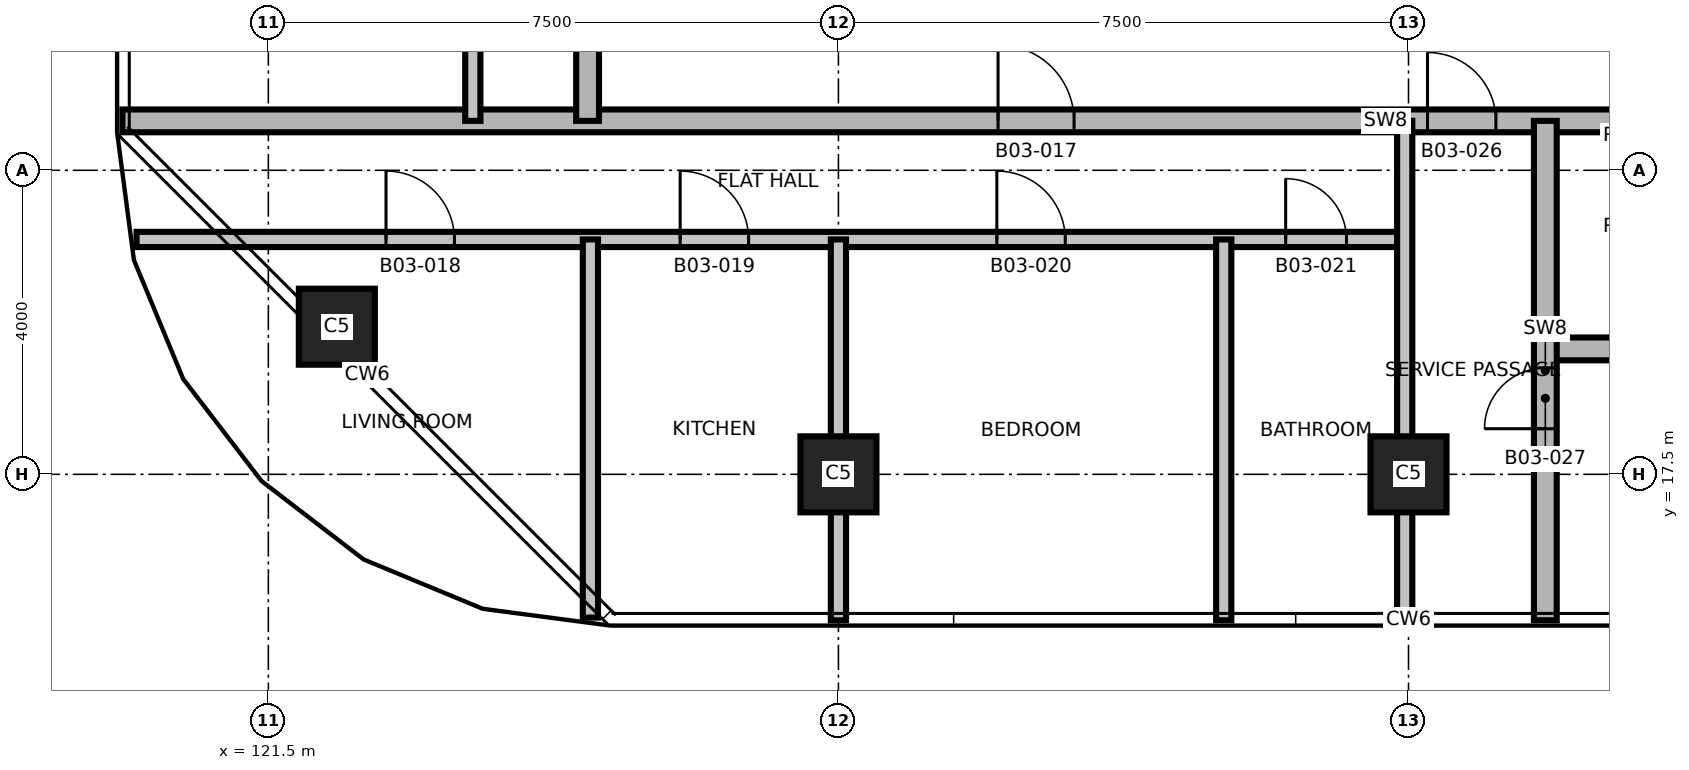
"""IFC4 building model, lengths in metres.
Left out: names, types, materials, properties, quantities, classifications, styles, units other than length and angle.
Written with IfcOpenShell. Run it as: python <this file> out.ifc"""

import sys

from ifc_helpers import new_model, si_unit, direction, frame, frame_2d, origin, origin_2d, place, context, subcontext, project, spatial, rectangle, extrude, element, fill, save


model = new_model("IFC4")
c1 = context("Model", 3, precision=1e-05, world=origin(), true_north=direction((0.0, 1.0)))
c2 = subcontext(c1, "Body", "Model", "MODEL_VIEW")
j1 = project(units=[si_unit("LENGTHUNIT", "METRE"), si_unit("PLANEANGLEUNIT", "RADIAN")], contexts=[c1])
p1 = place(None, origin())
s1 = spatial("IfcSite", under=j1, at=p1, CompositionType="ELEMENT")
p2 = place(p1, origin())
s2 = spatial("IfcBuilding", under=s1, at=p2, CompositionType="ELEMENT")
p3 = place(p2, frame((0.0, 0.0, 55.7)))
s3 = spatial("IfcBuildingStorey", under=s2, at=p3, CompositionType="ELEMENT", Elevation=55.7)
for number, where, z_axis, x_axis in (
    (1, (129.0, 17.5, 0.0), (0.0, 0.0, 1.0), (1.0, 0.0, 0.0)),
    (2, (136.5, 17.5, 0.0), (0.0, 0.0, 1.0), (1.0, 0.0, 0.0)),
    (3, (122.401, 19.442, 0.0), (0.0, 0.0, 1.0), (1.0, 0.0, 0.0)),
):
    element("IfcColumn", number, at=place(p3, frame(where, z_axis=z_axis, x_axis=x_axis)), inside=s3, PredefinedType="COLUMN", context=c2, shape_type="SweptSolid", body=[
        extrude(rectangle(XDim=1.0, YDim=1.0, at=origin_2d()), origin(), (0.0, 0.0, 1.0), 3.7),
    ])
p4 = place(p3, frame((138.25, 19.15, 0.0), z_axis=(0.0, 0.0, 1.0), x_axis=(1.0, 0.0, 0.0)))
e4 = element("IfcWall", 4, at=p4, inside=s3, PredefinedType="SHEAR", context=c2, shape_type="SweptSolid", body=[
    extrude(rectangle(XDim=5.75, YDim=0.3, at=frame_2d((2.875, 0.0))), origin(), (0.0, 0.0, 1.0), 3.4),
])
p5 = place(p3, frame((119.766, 20.59, 0.0), z_axis=(0.0, 0.0, 1.0), x_axis=(1.0, 0.0, 0.0)))
e5 = element("IfcWall", 5, at=p5, inside=s3, PredefinedType="PARTITIONING", context=c2, shape_type="SweptSolid", body=[
    extrude(rectangle(XDim=16.734, YDim=0.2, at=frame_2d((8.367, 0.0))), origin(), (0.0, 0.0, 1.0), 3.4),
])
p6 = place(p5, frame((3.282, 0.0, 0.0)))
e6 = element("IfcOpeningElement", 6, at=p6, cuts=e5, PredefinedType="OPENING", context=c2, shape_type="SweptSolid", body=[
    extrude(rectangle(XDim=0.9, YDim=2.1, at=frame_2d((0.45, 1.05))), frame((0.0, 0.11, 0.0), z_axis=(0.0, -1.0, 0.0), x_axis=(1.0, 0.0, 0.0)), (0.0, 0.0, 1.0), 0.22),
])
p7 = place(p5, frame((7.152, 0.0, 0.0)))
e7 = element("IfcOpeningElement", 7, at=p7, cuts=e5, PredefinedType="OPENING", context=c2, shape_type="SweptSolid", body=[
    extrude(rectangle(XDim=0.9, YDim=2.1, at=frame_2d((0.45, 1.05))), frame((0.0, 0.11, 0.0), z_axis=(0.0, -1.0, 0.0), x_axis=(1.0, 0.0, 0.0)), (0.0, 0.0, 1.0), 0.22),
])
p8 = place(p5, frame((11.318, 0.0, 0.0)))
e8 = element("IfcOpeningElement", 8, at=p8, cuts=e5, PredefinedType="OPENING", context=c2, shape_type="SweptSolid", body=[
    extrude(rectangle(XDim=0.9, YDim=2.1, at=frame_2d((0.45, 1.05))), frame((0.0, 0.11, 0.0), z_axis=(0.0, -1.0, 0.0), x_axis=(1.0, 0.0, 0.0)), (0.0, 0.0, 1.0), 0.22),
])
p9 = place(p5, frame((15.118, 0.0, 0.0)))
e9 = element("IfcOpeningElement", 9, at=p9, cuts=e5, PredefinedType="OPENING", context=c2, shape_type="SweptSolid", body=[
    extrude(rectangle(XDim=0.8, YDim=2.1, at=frame_2d((0.4, 1.05))), frame((0.0, 0.11, 0.0), z_axis=(0.0, -1.0, 0.0), x_axis=(1.0, 0.0, 0.0)), (0.0, 0.0, 1.0), 0.22),
])
p10 = place(p3, frame((119.58, 22.15, 0.0), z_axis=(0.0, 0.0, 1.0), x_axis=(1.0, 0.0, 0.0)))
e10 = element("IfcWall", 10, at=p10, inside=s3, PredefinedType="SHEAR", context=c2, shape_type="SweptSolid", body=[
    extrude(rectangle(XDim=33.84, YDim=0.3, at=frame_2d((16.92, 0.0))), origin(), (0.0, 0.0, 1.0), 3.4),
])
p11 = place(p10, frame((23.17, 0.0, 0.0)))
e11 = element("IfcOpeningElement", 11, at=p11, cuts=e10, PredefinedType="OPENING", context=c2, shape_type="SweptSolid", body=[
    extrude(rectangle(XDim=1.0, YDim=2.1, at=frame_2d((0.5, 1.05))), frame((0.0, 0.16, 0.0), z_axis=(0.0, -1.0, 0.0), x_axis=(1.0, 0.0, 0.0)), (0.0, 0.0, 1.0), 0.32),
])
p12 = place(p10, frame((11.52, 0.0, 0.0)))
e12 = element("IfcOpeningElement", 12, at=p12, cuts=e10, PredefinedType="OPENING", context=c2, shape_type="SweptSolid", body=[
    extrude(rectangle(XDim=1.0, YDim=2.1, at=frame_2d((0.5, 1.05))), frame((0.0, 0.16, 0.0), z_axis=(0.0, -1.0, 0.0), x_axis=(1.0, 0.0, 0.0)), (0.0, 0.0, 1.0), 0.32),
])
p13 = place(p10, frame((25.07, 0.0, 0.0)))
e13 = element("IfcOpeningElement", 13, at=p13, cuts=e10, PredefinedType="OPENING", context=c2, shape_type="SweptSolid", body=[
    extrude(rectangle(XDim=1.0, YDim=2.1, at=frame_2d((0.5, 1.05))), frame((0.0, 0.16, 0.0), z_axis=(0.0, -1.0, 0.0), x_axis=(1.0, 0.0, 0.0)), (0.0, 0.0, 1.0), 0.32),
])
p14 = place(p10, frame((17.17, 0.0, 0.0)))
e14 = element("IfcOpeningElement", 14, at=p14, cuts=e10, PredefinedType="OPENING", context=c2, shape_type="SweptSolid", body=[
    extrude(rectangle(XDim=0.9, YDim=2.1, at=frame_2d((0.45, 1.05))), frame((0.0, 0.16, 0.0), z_axis=(0.0, -1.0, 0.0), x_axis=(1.0, 0.0, 0.0)), (0.0, 0.0, 1.0), 0.32),
])
p15 = place(p3, frame((124.19, 22.15, 0.0), z_axis=(0.0, 0.0, 1.0), x_axis=(0.0, 1.0, 0.0)))
e15 = element("IfcWall", 15, at=p15, inside=s3, PredefinedType="PARTITIONING", context=c2, shape_type="SweptSolid", body=[
    extrude(rectangle(XDim=17.7, YDim=0.2, at=frame_2d((8.85, 0.0))), origin(), (0.0, 0.0, 1.0), 3.4),
])
p16 = place(p15, frame((1.028, 0.0, 0.0)))
e16 = element("IfcOpeningElement", 16, at=p16, cuts=e15, PredefinedType="OPENING", context=c2, shape_type="SweptSolid", body=[
    extrude(rectangle(XDim=0.9, YDim=2.1, at=frame_2d((0.45, 1.05))), frame((0.0, 0.11, 0.0), z_axis=(0.0, -1.0, 0.0), x_axis=(1.0, 0.0, 0.0)), (0.0, 0.0, 1.0), 0.22),
])
p17 = place(p15, frame((3.253, 0.0, 0.0)))
e17 = element("IfcOpeningElement", 17, at=p17, cuts=e15, PredefinedType="OPENING", context=c2, shape_type="SweptSolid", body=[
    extrude(rectangle(XDim=0.8, YDim=2.1, at=frame_2d((0.4, 1.05))), frame((0.0, 0.11, 0.0), z_axis=(0.0, -1.0, 0.0), x_axis=(1.0, 0.0, 0.0)), (0.0, 0.0, 1.0), 0.22),
])
p18 = place(p15, frame((6.867, 0.0, 0.0)))
e18 = element("IfcOpeningElement", 18, at=p18, cuts=e15, PredefinedType="OPENING", context=c2, shape_type="SweptSolid", body=[
    extrude(rectangle(XDim=0.9, YDim=2.1, at=frame_2d((0.45, 1.05))), frame((0.0, 0.11, 0.0), z_axis=(0.0, -1.0, 0.0), x_axis=(1.0, 0.0, 0.0)), (0.0, 0.0, 1.0), 0.22),
])
p19 = place(p15, frame((11.367, 0.0, 0.0)))
e19 = element("IfcOpeningElement", 19, at=p19, cuts=e15, PredefinedType="OPENING", context=c2, shape_type="SweptSolid", body=[
    extrude(rectangle(XDim=0.9, YDim=2.1, at=frame_2d((0.45, 1.05))), frame((0.0, 0.11, 0.0), z_axis=(0.0, -1.0, 0.0), x_axis=(1.0, 0.0, 0.0)), (0.0, 0.0, 1.0), 0.22),
])
p20 = place(p15, frame((15.075, 0.0, 0.0)))
e20 = element("IfcOpeningElement", 20, at=p20, cuts=e15, PredefinedType="OPENING", context=c2, shape_type="SweptSolid", body=[
    extrude(rectangle(XDim=0.9, YDim=2.1, at=frame_2d((0.45, 1.05))), frame((0.0, 0.11, 0.0), z_axis=(0.0, -1.0, 0.0), x_axis=(1.0, 0.0, 0.0)), (0.0, 0.0, 1.0), 0.22),
])
p21 = place(p3, frame((125.7, 22.15, 0.0), z_axis=(0.0, 0.0, 1.0), x_axis=(0.0, 1.0, 0.0)))
e21 = element("IfcWall", 21, at=p21, inside=s3, PredefinedType="SHEAR", context=c2, shape_type="SweptSolid", body=[
    extrude(rectangle(XDim=17.7, YDim=0.3, at=frame_2d((8.85, 0.0))), origin(), (0.0, 0.0, 1.0), 3.4),
])
p22 = place(p21, frame((2.7, 0.0, 0.0)))
e22 = element("IfcOpeningElement", 22, at=p22, cuts=e21, PredefinedType="OPENING", context=c2, shape_type="SweptSolid", body=[
    extrude(rectangle(XDim=1.0, YDim=2.1, at=frame_2d((0.5, 1.05))), frame((0.0, 0.16, 0.0), z_axis=(0.0, -1.0, 0.0), x_axis=(1.0, 0.0, 0.0)), (0.0, 0.0, 1.0), 0.32),
])
p23 = place(p3, frame((125.737, 15.615, 0.0), z_axis=(0.0, 0.0, 1.0), x_axis=(0.0, 1.0, 0.0)))
e23 = element("IfcWall", 23, at=p23, inside=s3, PredefinedType="PARTITIONING", context=c2, shape_type="SweptSolid", body=[
    extrude(rectangle(XDim=4.975, YDim=0.2, at=frame_2d((2.488, 0.0))), origin(), (0.0, 0.0, 1.0), 3.4),
])
for number, where, z_axis, x_axis in (
    (24, (129.0, 15.58, 0.0), (0.0, 0.0, 1.0), (0.0, 1.0, 0.0)),
    (25, (134.069, 15.58, 0.0), (0.0, 0.0, 1.0), (0.0, 1.0, 0.0)),
):
    element("IfcWall", number, at=place(p3, frame(where, z_axis=z_axis, x_axis=x_axis)), inside=s3, PredefinedType="PARTITIONING", context=c2, shape_type="SweptSolid", body=[
        extrude(rectangle(XDim=5.01, YDim=0.2, at=frame_2d((2.505, 0.0))), origin(), (0.0, 0.0, 1.0), 3.4),
    ])
p24 = place(p3, frame((136.45, 15.58, 0.0), z_axis=(0.0, 0.0, 1.0), x_axis=(0.0, 1.0, 0.0)))
e26 = element("IfcWall", 26, at=p24, inside=s3, PredefinedType="PARTITIONING", context=c2, shape_type="SweptSolid", body=[
    extrude(rectangle(XDim=6.57, YDim=0.2, at=frame_2d((3.285, 0.0))), origin(), (0.0, 0.0, 1.0), 3.4),
])
p25 = place(p3, frame((138.3, 15.58, 0.0), z_axis=(0.0, 0.0, 1.0), x_axis=(0.0, 1.0, 0.0)))
e27 = element("IfcWall", 27, at=p25, inside=s3, PredefinedType="SHEAR", context=c2, shape_type="SweptSolid", body=[
    extrude(rectangle(XDim=6.57, YDim=0.3, at=frame_2d((3.285, 0.0))), origin(), (0.0, 0.0, 1.0), 3.4),
])
p26 = place(p25, frame((2.52, 0.0, 0.0)))
e28 = element("IfcOpeningElement", 28, at=p26, cuts=e27, PredefinedType="OPENING", context=c2, shape_type="SweptSolid", body=[
    extrude(rectangle(XDim=0.8, YDim=2.1, at=frame_2d((0.4, 1.05))), frame((0.0, 0.16, 0.0), z_axis=(0.0, -1.0, 0.0), x_axis=(1.0, 0.0, 0.0)), (0.0, 0.0, 1.0), 0.32),
])
p27 = place(p12, origin())
e29 = element("IfcDoor", 29, at=p27, inside=s3, OperationType="SINGLE_SWING_LEFT", PredefinedType="DOOR", context=c2, shape_type="SweptSolid", body=[
    extrude(rectangle(XDim=1.0, YDim=2.1, at=frame_2d((0.5, 1.05))), frame((0.0, 0.025, 0.0), z_axis=(0.0, -1.0, 0.0), x_axis=(1.0, 0.0, 0.0)), (0.0, 0.0, 1.0), 0.05),
])
fill(e12, e29)
p28 = place(p6, origin())
e30 = element("IfcDoor", 30, at=p28, inside=s3, OperationType="SINGLE_SWING_RIGHT", PredefinedType="DOOR", context=c2, shape_type="SweptSolid", body=[
    extrude(rectangle(XDim=0.9, YDim=2.1, at=frame_2d((0.45, 1.05))), frame((0.0, 0.025, 0.0), z_axis=(0.0, -1.0, 0.0), x_axis=(1.0, 0.0, 0.0)), (0.0, 0.0, 1.0), 0.05),
])
fill(e6, e30)
p29 = place(p7, origin())
e31 = element("IfcDoor", 31, at=p29, inside=s3, OperationType="SINGLE_SWING_LEFT", PredefinedType="DOOR", context=c2, shape_type="SweptSolid", body=[
    extrude(rectangle(XDim=0.9, YDim=2.1, at=frame_2d((0.45, 1.05))), frame((0.0, 0.025, 0.0), z_axis=(0.0, -1.0, 0.0), x_axis=(1.0, 0.0, 0.0)), (0.0, 0.0, 1.0), 0.05),
])
fill(e7, e31)
p30 = place(p8, origin())
e32 = element("IfcDoor", 32, at=p30, inside=s3, OperationType="SINGLE_SWING_RIGHT", PredefinedType="DOOR", context=c2, shape_type="SweptSolid", body=[
    extrude(rectangle(XDim=0.9, YDim=2.1, at=frame_2d((0.45, 1.05))), frame((0.0, 0.025, 0.0), z_axis=(0.0, -1.0, 0.0), x_axis=(1.0, 0.0, 0.0)), (0.0, 0.0, 1.0), 0.05),
])
fill(e8, e32)
p31 = place(p9, origin())
e33 = element("IfcDoor", 33, at=p31, inside=s3, OperationType="SINGLE_SWING_LEFT", PredefinedType="DOOR", context=c2, shape_type="SweptSolid", body=[
    extrude(rectangle(XDim=0.8, YDim=2.1, at=frame_2d((0.4, 1.05))), frame((0.0, 0.025, 0.0), z_axis=(0.0, -1.0, 0.0), x_axis=(1.0, 0.0, 0.0)), (0.0, 0.0, 1.0), 0.05),
])
fill(e9, e33)
p32 = place(p14, origin())
e34 = element("IfcDoor", 34, at=p32, inside=s3, OperationType="SINGLE_SWING_RIGHT", PredefinedType="DOOR", context=c2, shape_type="SweptSolid", body=[
    extrude(rectangle(XDim=0.9, YDim=2.1, at=frame_2d((0.45, 1.05))), frame((0.0, 0.025, 0.0), z_axis=(0.0, -1.0, 0.0), x_axis=(1.0, 0.0, 0.0)), (0.0, 0.0, 1.0), 0.05),
])
fill(e14, e34)
p33 = place(p26, origin())
e35 = element("IfcDoor", 35, at=p33, inside=s3, OperationType="SINGLE_SWING_LEFT", PredefinedType="DOOR", context=c2, shape_type="SweptSolid", body=[
    extrude(rectangle(XDim=0.8, YDim=2.1, at=frame_2d((0.4, 1.05))), frame((0.0, 0.025, 0.0), z_axis=(0.0, -1.0, 0.0), x_axis=(1.0, 0.0, 0.0)), (0.0, 0.0, 1.0), 0.05),
])
fill(e28, e35)
save(model, sys.argv[1])
